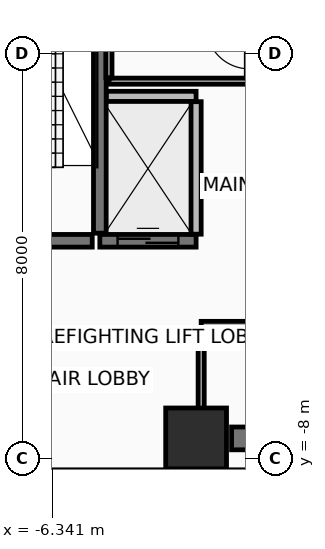
"""IFC4 building model, lengths in metres.
Left out: names, types, materials, properties, quantities, classifications, styles, units other than length and angle.
Written with IfcOpenShell. Run it as: python <this file> out.ifc"""

import sys

from ifc_helpers import new_model, si_unit, direction, frame, frame_2d, origin, origin_2d, place, context, subcontext, project, spatial, rectangle, extrude, element, fill, save


model = new_model("IFC4")
c1 = context("Model", 3, precision=1e-05, world=origin(), true_north=direction((0.0, 1.0)))
c2 = subcontext(c1, "Body", "Model", "MODEL_VIEW")
j1 = project(units=[si_unit("LENGTHUNIT", "METRE"), si_unit("PLANEANGLEUNIT", "RADIAN")], contexts=[c1])
p1 = place(None, origin())
s1 = spatial("IfcSite", under=j1, at=p1, CompositionType="ELEMENT")
p2 = place(p1, origin())
s2 = spatial("IfcBuilding", under=s1, at=p2, CompositionType="ELEMENT")
p3 = place(p2, frame((0.0, 0.0, 160.4)))
s3 = spatial("IfcBuildingStorey", under=s2, at=p3, CompositionType="ELEMENT", Elevation=160.4)
p4 = place(p3, frame((-3.5, -7.6, 0.0), z_axis=(0.0, 0.0, 1.0), x_axis=(1.0, 0.0, 0.0)))
e1 = element("IfcColumn", 1, at=p4, inside=s3, PredefinedType="COLUMN", context=c2, shape_type="SweptSolid", body=[
    extrude(rectangle(XDim=1.2, YDim=1.2, at=origin_2d()), origin(), (0.0, 0.0, 1.0), 4.75),
])
p5 = place(p3, frame((-2.8, -7.6, 0.0), z_axis=(0.0, 0.0, 1.0), x_axis=(1.0, 0.0, 0.0)))
e2 = element("IfcWall", 2, at=p5, inside=s3, PredefinedType="SHEAR", context=c2, shape_type="SweptSolid", body=[
    extrude(rectangle(XDim=5.38, YDim=0.45, at=frame_2d((2.69, 0.0))), origin(), (0.0, 0.0, 1.0), 4.555),
])
p6 = place(p3, frame((-5.4, -3.55, 0.0), z_axis=(0.0, 0.0, 1.0), x_axis=(0.0, 1.0, 0.0)))
e3 = element("IfcWall", 3, at=p6, inside=s3, PredefinedType="SHEAR", context=c2, shape_type="SweptSolid", body=[
    extrude(rectangle(XDim=7.3, YDim=0.25, at=frame_2d((3.65, 0.0))), origin(), (0.0, 0.0, 1.0), 4.555),
])
p7 = place(p3, frame((-8.5, -3.7, 0.0), z_axis=(0.0, 0.0, 1.0), x_axis=(1.0, 0.0, 0.0)))
e4 = element("IfcWall", 4, at=p7, inside=s3, PredefinedType="SHEAR", context=c2, shape_type="SweptSolid", body=[
    extrude(rectangle(XDim=2.95, YDim=0.25, at=frame_2d((1.475, 0.0))), origin(), (0.0, 0.0, 1.0), 4.555),
])
p8 = place(p7, frame((0.9, 0.0, 0.0)))
e5 = element("IfcOpeningElement", 5, at=p8, cuts=e4, PredefinedType="OPENING", context=c2, shape_type="SweptSolid", body=[
    extrude(rectangle(XDim=1.1, YDim=2.15, at=frame_2d((0.55, 1.075))), frame((0.0, 0.135, 0.0), z_axis=(0.0, -1.0, 0.0), x_axis=(1.0, 0.0, 0.0)), (0.0, 0.0, 1.0), 0.27),
])
p9 = place(p3, frame((-5.4, -3.7, 0.0), z_axis=(0.0, 0.0, 1.0), x_axis=(1.0, 0.0, 0.0)))
e6 = element("IfcWall", 6, at=p9, inside=s3, PredefinedType="SHEAR", context=c2, shape_type="SweptSolid", body=[
    extrude(rectangle(XDim=1.9, YDim=0.25, at=frame_2d((0.95, 0.0))), origin(), (0.0, 0.0, 1.0), 4.555),
])
p10 = place(p9, frame((0.35, 0.0, 0.0)))
e7 = element("IfcOpeningElement", 7, at=p10, cuts=e6, PredefinedType="OPENING", context=c2, shape_type="SweptSolid", body=[
    extrude(rectangle(XDim=1.2, YDim=2.2, at=frame_2d((0.6, 1.1))), frame((0.0, 0.135, 0.0), z_axis=(0.0, -1.0, 0.0), x_axis=(1.0, 0.0, 0.0)), (0.0, 0.0, 1.0), 0.27),
])
p11 = place(p3, frame((-5.27, -0.85, 0.0), z_axis=(0.0, 0.0, 1.0), x_axis=(1.0, 0.0, 0.0)))
e8 = element("IfcWall", 8, at=p11, inside=s3, PredefinedType="PARTITIONING", context=c2, shape_type="SweptSolid", body=[
    extrude(rectangle(XDim=1.77, YDim=0.2, at=frame_2d((0.885, 0.0))), origin(), (0.0, 0.0, 1.0), 4.555),
])
p12 = place(p3, frame((-3.5, -3.57, 0.0), z_axis=(0.0, 0.0, 1.0), x_axis=(0.0, 1.0, 0.0)))
e9 = element("IfcWall", 9, at=p12, inside=s3, PredefinedType="PARTITIONING", context=c2, shape_type="SweptSolid", body=[
    extrude(rectangle(XDim=2.615, YDim=0.2, at=frame_2d((1.308, 0.0))), origin(), (0.0, 0.0, 1.0), 4.555),
])
p13 = place(p3, frame((-5.22, -0.55, 0.0), z_axis=(0.0, 0.0, 1.0), x_axis=(1.0, 0.0, 0.0)))
e10 = element("IfcWall", 10, at=p13, inside=s3, PredefinedType="PARTITIONING", context=c2, shape_type="SweptSolid", body=[
    extrude(rectangle(XDim=2.77, YDim=0.12, at=frame_2d((1.385, 0.0))), origin(), (0.0, 0.0, 1.0), 4.555),
])
p14 = place(p3, frame((-5.22, 0.655, 0.0), z_axis=(0.0, 0.0, 1.0), x_axis=(0.0, -1.0, 0.0)))
e11 = element("IfcWall", 11, at=p14, inside=s3, PredefinedType="PARTITIONING", context=c2, shape_type="SweptSolid", body=[
    extrude(rectangle(XDim=1.14, YDim=0.12, at=frame_2d((0.57, 0.0))), origin(), (0.0, 0.0, 1.0), 4.555),
])
p15 = place(p3, frame((2.135, -5.35, 0.0), z_axis=(0.0, 0.0, 1.0), x_axis=(-1.0, 0.0, 0.0)))
e12 = element("IfcWall", 12, at=p15, inside=s3, PredefinedType="PARTITIONING", context=c2, shape_type="SweptSolid", body=[
    extrude(rectangle(XDim=5.535, YDim=0.12, at=frame_2d((2.768, 0.0))), origin(), (0.0, 0.0, 1.0), 3.75),
])
p16 = place(p3, frame((-3.4, -5.415, 0.0), z_axis=(0.0, 0.0, 1.0), x_axis=(0.0, -1.0, 0.0)))
e13 = element("IfcWall", 13, at=p16, inside=s3, PredefinedType="PARTITIONING", context=c2, shape_type="SweptSolid", body=[
    extrude(rectangle(XDim=2.8, YDim=0.12, at=frame_2d((1.4, 0.0))), origin(), (0.0, 0.0, 1.0), 3.75),
])
p17 = place(p10, origin())
e14 = element("IfcDoor", 14, at=p17, inside=s3, OperationType="SLIDING_TO_RIGHT", PredefinedType="DOOR", context=c2, shape_type="SweptSolid", body=[
    extrude(rectangle(XDim=1.2, YDim=2.2, at=frame_2d((0.6, 1.1))), frame((0.0, 0.025, 0.0), z_axis=(0.0, -1.0, 0.0), x_axis=(1.0, 0.0, 0.0)), (0.0, 0.0, 1.0), 0.05),
])
fill(e7, e14)
save(model, sys.argv[1])
